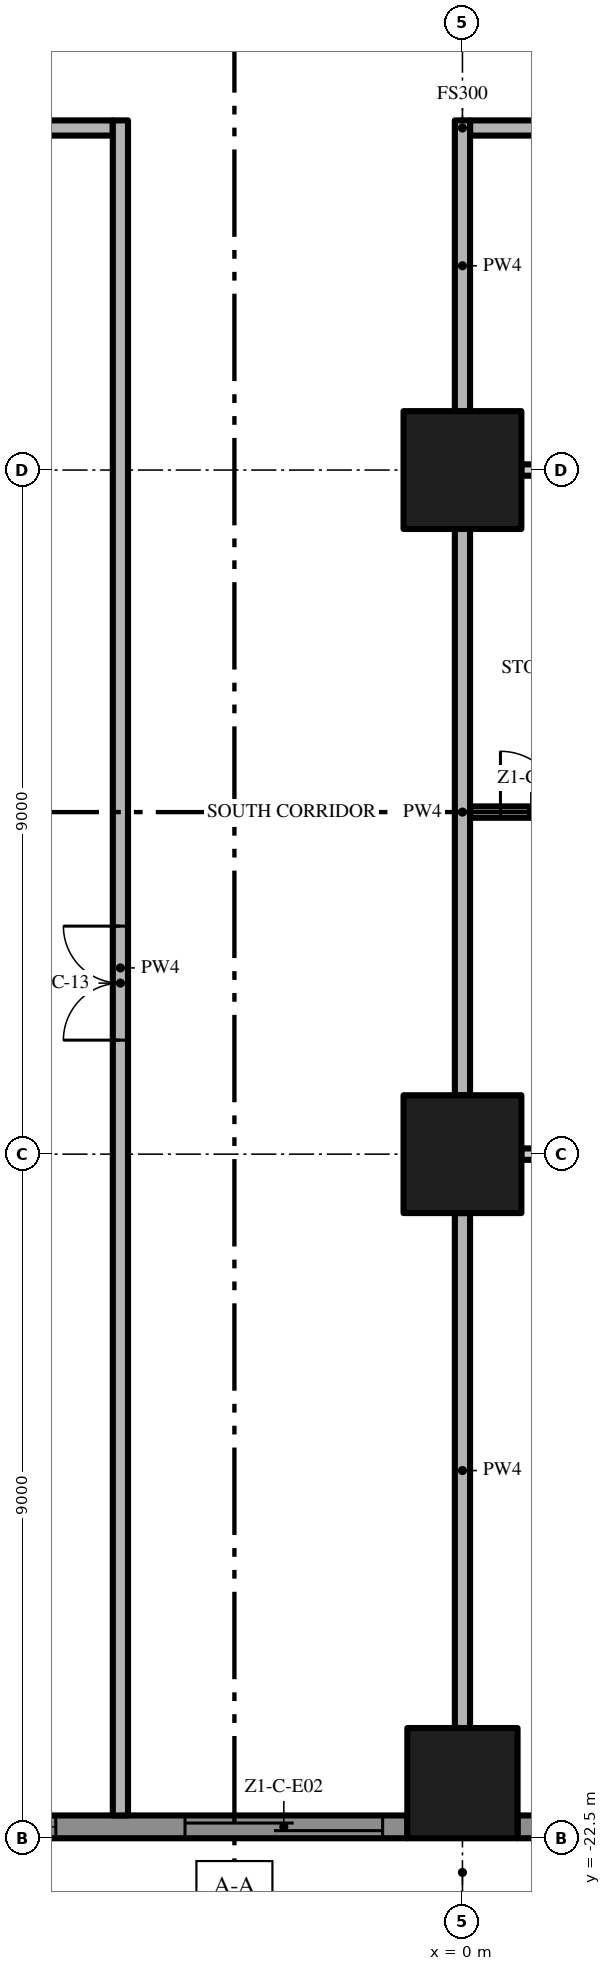
"""IFC4 building model, lengths in metres.
Left out: names, types, materials, properties, quantities, classifications, styles, units other than length and angle.
Written with IfcOpenShell. Run it as: python <this file> out.ifc"""

import sys

from ifc_helpers import new_model, si_unit, direction, frame, frame_2d, origin, origin_2d, place, context, subcontext, project, spatial, polyline, rectangle, outline, extrude, element, fill, save


model = new_model("IFC4")
c1 = context("Model", 3, precision=1e-05, world=origin(), true_north=direction((0.0, 1.0)))
c2 = subcontext(c1, "Body", "Model", "MODEL_VIEW")
j1 = project(units=[si_unit("LENGTHUNIT", "METRE"), si_unit("PLANEANGLEUNIT", "RADIAN")], contexts=[c1])
p1 = place(None, origin())
s1 = spatial("IfcSite", under=j1, at=p1, CompositionType="ELEMENT")
p2 = place(p1, origin())
s2 = spatial("IfcBuilding", under=s1, at=p2, CompositionType="ELEMENT")
p3 = place(p2, frame((0.0, 0.0, 37.8)))
s3 = spatial("IfcBuildingStorey", under=s2, at=p3, CompositionType="ELEMENT", Elevation=37.8)
p4 = place(p3, frame((0.0, -13.5, 0.0), z_axis=(0.0, 0.0, 1.0), x_axis=(1.0, 0.0, 0.0)))
e1 = element("IfcColumn", 1, at=p4, inside=s3, PredefinedType="COLUMN", context=c2, shape_type="SweptSolid", body=[
    extrude(rectangle(XDim=1.55, YDim=1.55, at=origin_2d()), origin(), (0.0, 0.0, 1.0), 3.5),
])
p5 = place(p3, frame((0.0, -21.775, 0.0), z_axis=(0.0, 0.0, 1.0), x_axis=(1.0, 0.0, 0.0)))
e2 = element("IfcColumn", 2, at=p5, inside=s3, PredefinedType="COLUMN", context=c2, shape_type="SweptSolid", body=[
    extrude(rectangle(XDim=1.45, YDim=1.45, at=origin_2d()), origin(), (0.0, 0.0, 1.0), 3.5),
])
p6 = place(p3, frame((0.0, -4.5, 0.0), z_axis=(0.0, 0.0, 1.0), x_axis=(1.0, 0.0, 0.0)))
e3 = element("IfcColumn", 3, at=p6, inside=s3, PredefinedType="COLUMN", context=c2, shape_type="SweptSolid", body=[
    extrude(rectangle(XDim=1.55, YDim=1.55, at=origin_2d()), origin(), (0.0, 0.0, 1.0), 3.5),
])
p7 = place(p3, frame((-0.725, -22.35, 0.0), z_axis=(0.0, 0.0, 1.0), x_axis=(-1.0, 0.0, 0.0)))
e4 = element("IfcWall", 4, at=p7, inside=s3, PredefinedType="SOLIDWALL", context=c2, shape_type="SweptSolid", body=[
    extrude(rectangle(XDim=7.55, YDim=0.3, at=frame_2d((3.775, 0.0))), origin(), (0.0, 0.0, 1.0), 3.5),
])
p8 = place(p7, frame((4.625, 0.0, 0.45)))
e5 = element("IfcOpeningElement", 5, at=p8, cuts=e4, PredefinedType="OPENING", context=c2, shape_type="SweptSolid", body=[
    extrude(rectangle(XDim=2.6, YDim=2.65, at=frame_2d((1.3, 1.325))), frame((0.0, 0.16, 0.0), z_axis=(0.0, -1.0, 0.0), x_axis=(1.0, 0.0, 0.0)), (0.0, 0.0, 1.0), 0.32),
])
p9 = place(p7, frame((0.325, 0.0, 0.0)))
e6 = element("IfcOpeningElement", 6, at=p9, cuts=e4, PredefinedType="OPENING", context=c2, shape_type="SweptSolid", body=[
    extrude(rectangle(XDim=2.6, YDim=2.4, at=frame_2d((1.3, 1.2))), frame((0.0, 0.16, 0.0), z_axis=(0.0, -1.0, 0.0), x_axis=(1.0, 0.0, 0.0)), (0.0, 0.0, 1.0), 0.32),
])
p10 = place(p3, frame((8.275, -22.35, 0.0), z_axis=(0.0, 0.0, 1.0), x_axis=(-1.0, 0.0, 0.0)))
e7 = element("IfcWall", 7, at=p10, inside=s3, PredefinedType="SOLIDWALL", context=c2, shape_type="SweptSolid", body=[
    extrude(rectangle(XDim=7.55, YDim=0.3, at=frame_2d((3.775, 0.0))), origin(), (0.0, 0.0, 1.0), 3.5),
])
p11 = place(p10, frame((4.625, 0.0, 0.0)))
e8 = element("IfcOpeningElement", 8, at=p11, cuts=e7, PredefinedType="OPENING", context=c2, shape_type="SweptSolid", body=[
    extrude(rectangle(XDim=2.6, YDim=2.4, at=frame_2d((1.3, 1.2))), frame((0.0, 0.16, 0.0), z_axis=(0.0, -1.0, 0.0), x_axis=(1.0, 0.0, 0.0)), (0.0, 0.0, 1.0), 0.32),
])
p12 = place(p10, frame((0.325, 0.0, 0.45)))
e9 = element("IfcOpeningElement", 9, at=p12, cuts=e7, PredefinedType="OPENING", context=c2, shape_type="SweptSolid", body=[
    extrude(rectangle(XDim=2.6, YDim=2.65, at=frame_2d((1.3, 1.325))), frame((0.0, 0.16, 0.0), z_axis=(0.0, -1.0, 0.0), x_axis=(1.0, 0.0, 0.0)), (0.0, 0.0, 1.0), 0.32),
])
p13 = place(p3, origin())
e10 = element("IfcWall", 10, at=p13, inside=s3, PredefinedType="USERDEFINED", context=c2, shape_type="SweptSolid", body=[
    extrude(outline(polyline([(-22.5, -23.1), (-21.0, -23.329), (-19.5, -23.929), (-18.0, -24.671), (-16.5, -25.271), (-15.0, -25.5), (-13.5, -25.271), (-12.0, -24.671), (-10.5, -23.929), (-9.0, -23.329), (-7.5, -23.1), (-6.0, -23.329), (-4.5, -23.929), (-3.0, -24.671), (-1.5, -25.271), (0.0, -25.5), (1.5, -25.271), (3.0, -24.671), (4.5, -23.929), (6.0, -23.329), (7.5, -23.1), (9.0, -23.329), (10.5, -23.929), (12.0, -24.671), (13.5, -25.271), (15.0, -25.5), (16.5, -25.271), (18.0, -24.671), (19.5, -23.929), (21.0, -23.329), (22.5, -23.1), (22.462, -22.853), (20.934, -23.086), (19.398, -23.701), (17.898, -24.442), (16.434, -25.028), (15.0, -25.247), (13.566, -25.028), (12.102, -24.442), (10.602, -23.701), (9.066, -23.086), (7.5, -22.847), (5.934, -23.086), (4.398, -23.701), (2.898, -24.442), (1.434, -25.028), (0.0, -25.247), (-1.434, -25.028), (-2.898, -24.442), (-4.398, -23.701), (-5.934, -23.086), (-7.5, -22.847), (-9.066, -23.086), (-10.602, -23.701), (-12.102, -24.442), (-13.566, -25.028), (-15.0, -25.247), (-16.434, -25.028), (-17.898, -24.442), (-19.398, -23.701), (-20.934, -23.086), (-22.462, -22.853), (-22.5, -23.1)])), origin(), (0.0, 0.0, 1.0), 0.9),
])
p14 = place(p3, frame((8.225, -13.5, 0.0), z_axis=(0.0, 0.0, 1.0), x_axis=(-1.0, 0.0, 0.0)))
e11 = element("IfcWall", 11, at=p14, inside=s3, PredefinedType="PARTITIONING", context=c2, shape_type="SweptSolid", body=[
    extrude(rectangle(XDim=7.45, YDim=0.15, at=frame_2d((3.725, 0.0))), origin(), (0.0, 0.0, 1.0), 3.5),
])
p15 = place(p14, frame((6.3, 0.0, 0.0)))
e12 = element("IfcOpeningElement", 12, at=p15, cuts=e11, PredefinedType="OPENING", context=c2, shape_type="SweptSolid", body=[
    extrude(rectangle(XDim=1.0, YDim=2.4, at=frame_2d((0.5, 1.2))), frame((0.0, 0.085, 0.0), z_axis=(0.0, -1.0, 0.0), x_axis=(1.0, 0.0, 0.0)), (0.0, 0.0, 1.0), 0.17),
])
p16 = place(p14, frame((0.15, 0.0, 0.0)))
e13 = element("IfcOpeningElement", 13, at=p16, cuts=e11, PredefinedType="OPENING", context=c2, shape_type="SweptSolid", body=[
    extrude(rectangle(XDim=1.0, YDim=2.4, at=frame_2d((0.5, 1.2))), frame((0.0, 0.085, 0.0), z_axis=(0.0, -1.0, 0.0), x_axis=(1.0, 0.0, 0.0)), (0.0, 0.0, 1.0), 0.17),
])
p17 = place(p3, frame((0.1, -9.0, 0.0), z_axis=(0.0, 0.0, 1.0), x_axis=(1.0, 0.0, 0.0)))
e14 = element("IfcWall", 14, at=p17, inside=s3, PredefinedType="PARTITIONING", context=c2, shape_type="SweptSolid", body=[
    extrude(rectangle(XDim=13.4, YDim=0.15, at=frame_2d((6.7, 0.0))), origin(), (0.0, 0.0, 1.0), 3.5),
])
p18 = place(p17, frame((0.4, 0.0, 0.0)))
e15 = element("IfcOpeningElement", 15, at=p18, cuts=e14, PredefinedType="OPENING", context=c2, shape_type="SweptSolid", body=[
    extrude(rectangle(XDim=0.8, YDim=2.0, at=frame_2d((0.4, 1.0))), frame((0.0, 0.085, 0.0), z_axis=(0.0, -1.0, 0.0), x_axis=(1.0, 0.0, 0.0)), (0.0, 0.0, 1.0), 0.17),
])
p19 = place(p17, frame((6.9, 0.0, 0.0)))
e16 = element("IfcOpeningElement", 16, at=p19, cuts=e14, PredefinedType="OPENING", context=c2, shape_type="SweptSolid", body=[
    extrude(rectangle(XDim=1.0, YDim=2.4, at=frame_2d((0.5, 1.2))), frame((0.0, 0.085, 0.0), z_axis=(0.0, -1.0, 0.0), x_axis=(1.0, 0.0, 0.0)), (0.0, 0.0, 1.0), 0.17),
])
p20 = place(p3, frame((8.225, -4.5, 0.0), z_axis=(0.0, 0.0, 1.0), x_axis=(-1.0, 0.0, 0.0)))
e17 = element("IfcWall", 17, at=p20, inside=s3, PredefinedType="PARTITIONING", context=c2, shape_type="SweptSolid", body=[
    extrude(rectangle(XDim=7.45, YDim=0.15, at=frame_2d((3.725, 0.0))), origin(), (0.0, 0.0, 1.0), 3.5),
])
p21 = place(p20, frame((4.675, 0.0, 0.0)))
e18 = element("IfcOpeningElement", 18, at=p21, cuts=e17, PredefinedType="OPENING", context=c2, shape_type="SweptSolid", body=[
    extrude(rectangle(XDim=0.8, YDim=2.0, at=frame_2d((0.4, 1.0))), frame((0.0, 0.085, 0.0), z_axis=(0.0, -1.0, 0.0), x_axis=(1.0, 0.0, 0.0)), (0.0, 0.0, 1.0), 0.17),
])
p22 = place(p3, frame((-17.4, 0.0, 0.0), z_axis=(0.0, 0.0, 1.0), x_axis=(1.0, 0.0, 0.0)))
e19 = element("IfcWall", 19, at=p22, inside=s3, PredefinedType="PARTITIONING", context=c2, shape_type="SweptSolid", body=[
    extrude(rectangle(XDim=12.8, YDim=0.2, at=frame_2d((6.4, 0.0))), origin(), (0.0, 0.0, 1.0), 3.5),
])
p23 = place(p3, frame((17.4, 0.0, 0.0), z_axis=(0.0, 0.0, 1.0), x_axis=(-1.0, 0.0, 0.0)))
e20 = element("IfcWall", 20, at=p23, inside=s3, PredefinedType="PARTITIONING", context=c2, shape_type="SweptSolid", body=[
    extrude(rectangle(XDim=17.3, YDim=0.2, at=frame_2d((8.65, 0.0))), origin(), (0.0, 0.0, 1.0), 3.5),
])
p24 = place(p23, frame((7.65, 0.0, 0.0)))
e21 = element("IfcOpeningElement", 21, at=p24, cuts=e20, PredefinedType="OPENING", context=c2, shape_type="SweptSolid", body=[
    extrude(rectangle(XDim=1.5, YDim=2.4, at=frame_2d((0.75, 1.2))), frame((0.0, 0.11, 0.0), z_axis=(0.0, -1.0, 0.0), x_axis=(1.0, 0.0, 0.0)), (0.0, 0.0, 1.0), 0.22),
])
p25 = place(p3, frame((-4.5, -22.2, 0.0), z_axis=(0.0, 0.0, 1.0), x_axis=(0.0, 1.0, 0.0)))
e22 = element("IfcWall", 22, at=p25, inside=s3, PredefinedType="PARTITIONING", context=c2, shape_type="SweptSolid", body=[
    extrude(rectangle(XDim=22.3, YDim=0.2, at=frame_2d((11.15, 0.0))), origin(), (0.0, 0.0, 1.0), 3.5),
])
p26 = place(p25, frame((10.2, 0.0, 0.0)))
e23 = element("IfcOpeningElement", 23, at=p26, cuts=e22, PredefinedType="OPENING", context=c2, shape_type="SweptSolid", body=[
    extrude(rectangle(XDim=1.5, YDim=2.4, at=frame_2d((0.75, 1.2))), frame((0.0, 0.11, 0.0), z_axis=(0.0, -1.0, 0.0), x_axis=(1.0, 0.0, 0.0)), (0.0, 0.0, 1.0), 0.22),
])
p27 = place(p3, frame((0.0, -21.05, 0.0), z_axis=(0.0, 0.0, 1.0), x_axis=(0.0, 1.0, 0.0)))
e24 = element("IfcWall", 24, at=p27, inside=s3, PredefinedType="PARTITIONING", context=c2, shape_type="SweptSolid", body=[
    extrude(rectangle(XDim=6.775, YDim=0.2, at=frame_2d((3.388, 0.0))), origin(), (0.0, 0.0, 1.0), 3.5),
])
p28 = place(p3, frame((0.0, -12.725, 0.0), z_axis=(0.0, 0.0, 1.0), x_axis=(0.0, 1.0, 0.0)))
e25 = element("IfcWall", 25, at=p28, inside=s3, PredefinedType="PARTITIONING", context=c2, shape_type="SweptSolid", body=[
    extrude(rectangle(XDim=7.45, YDim=0.2, at=frame_2d((3.725, 0.0))), origin(), (0.0, 0.0, 1.0), 3.5),
])
p29 = place(p3, frame((0.0, -3.725, 0.0), z_axis=(0.0, 0.0, 1.0), x_axis=(0.0, 1.0, 0.0)))
e26 = element("IfcWall", 26, at=p29, inside=s3, PredefinedType="PARTITIONING", context=c2, shape_type="SweptSolid", body=[
    extrude(rectangle(XDim=3.825, YDim=0.2, at=frame_2d((1.913, 0.0))), origin(), (0.0, 0.0, 1.0), 3.5),
])
p30 = place(p8, origin())
e27 = element("IfcWindow", 27, at=p30, inside=s3, PartitioningType="SINGLE_PANEL", PredefinedType="WINDOW", context=c2, shape_type="SweptSolid", body=[
    extrude(rectangle(XDim=2.6, YDim=2.65, at=frame_2d((1.3, 1.325))), frame((0.0, 0.03, 0.0), z_axis=(0.0, -1.0, 0.0), x_axis=(1.0, 0.0, 0.0)), (0.0, 0.0, 1.0), 0.06),
])
fill(e5, e27)
p31 = place(p9, origin())
e28 = element("IfcDoor", 28, at=p31, inside=s3, OperationType="SINGLE_SWING_LEFT", PredefinedType="DOOR", context=c2, shape_type="SweptSolid", body=[
    extrude(rectangle(XDim=2.6, YDim=2.4, at=frame_2d((1.3, 1.2))), frame((0.0, 0.025, 0.0), z_axis=(0.0, -1.0, 0.0), x_axis=(1.0, 0.0, 0.0)), (0.0, 0.0, 1.0), 0.05),
])
fill(e6, e28)
p32 = place(p26, origin())
e29 = element("IfcDoor", 29, at=p32, inside=s3, OperationType="DOUBLE_DOOR_SINGLE_SWING", PredefinedType="DOOR", context=c2, shape_type="SweptSolid", body=[
    extrude(rectangle(XDim=1.5, YDim=2.4, at=frame_2d((0.75, 1.2))), frame((0.0, 0.025, 0.0), z_axis=(0.0, -1.0, 0.0), x_axis=(1.0, 0.0, 0.0)), (0.0, 0.0, 1.0), 0.05),
])
fill(e23, e29)
p33 = place(p18, origin())
e30 = element("IfcDoor", 30, at=p33, inside=s3, OperationType="SINGLE_SWING_LEFT", PredefinedType="DOOR", context=c2, shape_type="SweptSolid", body=[
    extrude(rectangle(XDim=0.8, YDim=2.0, at=frame_2d((0.4, 1.0))), frame((0.0, 0.025, 0.0), z_axis=(0.0, -1.0, 0.0), x_axis=(1.0, 0.0, 0.0)), (0.0, 0.0, 1.0), 0.05),
])
fill(e15, e30)
save(model, sys.argv[1])
